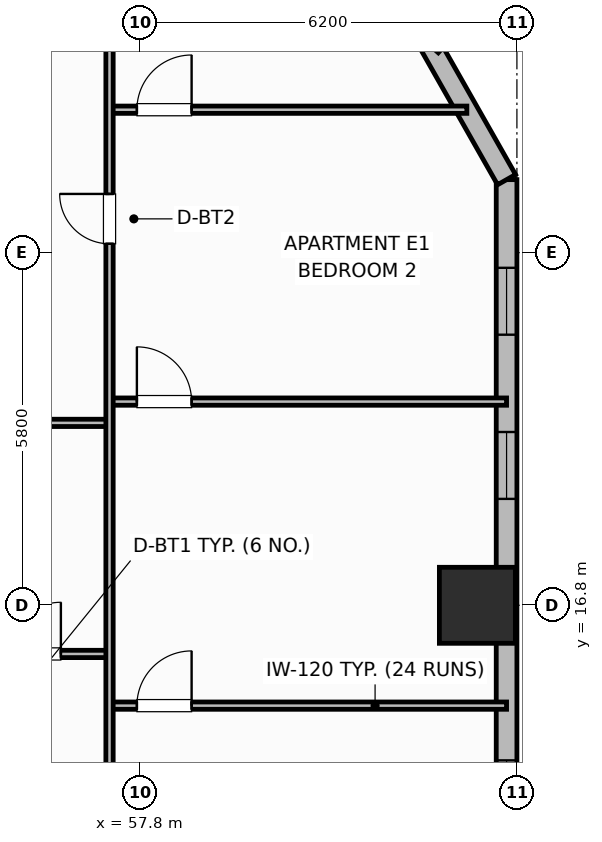
"""IFC4 building model, lengths in metres.
Left out: names, types, materials, properties, quantities, classifications, styles, units other than length and angle.
Written with IfcOpenShell. Run it as: python <this file> out.ifc"""

import sys

from ifc_helpers import new_model, si_unit, direction, frame, frame_2d, origin, origin_2d, place, context, subcontext, project, spatial, rectangle, extrude, element, fill, save


model = new_model("IFC4")
c1 = context("Model", 3, precision=1e-05, world=origin(), true_north=direction((0.0, 1.0)))
c2 = subcontext(c1, "Body", "Model", "MODEL_VIEW")
j1 = project(units=[si_unit("LENGTHUNIT", "METRE"), si_unit("PLANEANGLEUNIT", "RADIAN")], contexts=[c1])
p1 = place(None, origin())
s1 = spatial("IfcSite", under=j1, at=p1, CompositionType="ELEMENT")
p2 = place(p1, origin())
s2 = spatial("IfcBuilding", under=s1, at=p2, CompositionType="ELEMENT")
p3 = place(p2, frame((0.0, 0.0, 51.0)))
s3 = spatial("IfcBuildingStorey", under=s2, at=p3, CompositionType="ELEMENT", Elevation=51.0)
p4 = place(p3, frame((63.35, 16.8, 0.0), z_axis=(0.0, 0.0, 1.0), x_axis=(1.0, 0.0, 0.0)))
e1 = element("IfcColumn", 1, at=p4, inside=s3, PredefinedType="COLUMN", context=c2, shape_type="SweptSolid", body=[
    extrude(rectangle(XDim=1.25, YDim=1.25, at=origin_2d()), origin(), (0.0, 0.0, 1.0), 3.7),
])
p5 = place(p3, frame((63.83, 9.0, 0.0), z_axis=(0.0, 0.0, 1.0), x_axis=(0.0, 1.0, 0.0)))
e2 = element("IfcWall", 2, at=p5, inside=s3, PredefinedType="SOLIDWALL", context=c2, shape_type="SweptSolid", body=[
    extrude(rectangle(XDim=14.8, YDim=0.34, at=frame_2d((7.4, 0.0))), origin(), (0.0, 0.0, 1.0), 2.7),
])
p6 = place(p5, frame((4.15, 0.0, 0.93)))
e3 = element("IfcOpeningElement", 3, at=p6, cuts=e2, PredefinedType="OPENING", context=c2, shape_type="SweptSolid", body=[
    extrude(rectangle(XDim=1.1, YDim=1.65, at=frame_2d((0.55, 0.825))), frame((0.0, 0.18, 0.0), z_axis=(0.0, -1.0, 0.0), x_axis=(1.0, 0.0, 0.0)), (0.0, 0.0, 1.0), 0.36),
])
p7 = place(p5, frame((9.55, 0.0, 0.93)))
e4 = element("IfcOpeningElement", 4, at=p7, cuts=e2, PredefinedType="OPENING", context=c2, shape_type="SweptSolid", body=[
    extrude(rectangle(XDim=1.1, YDim=1.65, at=frame_2d((0.55, 0.825))), frame((0.0, 0.18, 0.0), z_axis=(0.0, -1.0, 0.0), x_axis=(1.0, 0.0, 0.0)), (0.0, 0.0, 1.0), 0.36),
])
p8 = place(p5, frame((12.25, 0.0, 0.93)))
e5 = element("IfcOpeningElement", 5, at=p8, cuts=e2, PredefinedType="OPENING", context=c2, shape_type="SweptSolid", body=[
    extrude(rectangle(XDim=1.1, YDim=1.65, at=frame_2d((0.55, 0.825))), frame((0.0, 0.18, 0.0), z_axis=(0.0, -1.0, 0.0), x_axis=(1.0, 0.0, 0.0)), (0.0, 0.0, 1.0), 0.36),
])
p9 = place(p3, frame((63.83, 23.8, 0.0), z_axis=(0.0, 0.0, 1.0), x_axis=(-0.494017696272, 0.869451847873, 0.0)))
e6 = element("IfcWall", 6, at=p9, inside=s3, PredefinedType="SOLIDWALL", context=c2, shape_type="SweptSolid", body=[
    extrude(rectangle(XDim=2.53, YDim=0.34, at=frame_2d((1.265, 0.0))), origin(), (0.0, 0.0, 1.0), 2.7),
])
p10 = place(p3, frame((62.58, 26.0, 0.0), z_axis=(0.0, 0.0, 1.0), x_axis=(0.666041619974, 0.74591457987, 0.0)))
e7 = element("IfcWall", 7, at=p10, inside=s3, PredefinedType="SOLIDWALL", context=c2, shape_type="SweptSolid", body=[
    extrude(rectangle(XDim=1.877, YDim=0.34, at=frame_2d((0.938, 0.0))), origin(), (0.0, 0.0, 1.0), 2.7),
])
p11 = place(p10, frame((0.16, 0.0, 0.69)))
e8 = element("IfcOpeningElement", 8, at=p11, cuts=e7, PredefinedType="OPENING", context=c2, shape_type="SweptSolid", body=[
    extrude(rectangle(XDim=1.4, YDim=1.85, at=frame_2d((0.7, 0.925))), frame((0.0, 0.18, 0.0), z_axis=(0.0, -1.0, 0.0), x_axis=(1.0, 0.0, 0.0)), (0.0, 0.0, 1.0), 0.36),
])
p12 = place(p3, frame((55.05, 16.0, 0.0), z_axis=(0.0, 0.0, 1.0), x_axis=(1.0, 0.0, 0.0)))
e9 = element("IfcWall", 9, at=p12, inside=s3, PredefinedType="PARTITIONING", context=c2, shape_type="SweptSolid", body=[
    extrude(rectangle(XDim=2.25, YDim=0.12, at=frame_2d((1.125, 0.0))), origin(), (0.0, 0.0, 1.0), 2.53),
])
p13 = place(p12, frame((0.6, 0.0, 0.0)))
e10 = element("IfcOpeningElement", 10, at=p13, cuts=e9, PredefinedType="OPENING", context=c2, shape_type="SweptSolid", body=[
    extrude(rectangle(XDim=0.85, YDim=2.1, at=frame_2d((0.425, 1.05))), frame((0.0, 0.07, 0.0), z_axis=(0.0, -1.0, 0.0), x_axis=(1.0, 0.0, 0.0)), (0.0, 0.0, 1.0), 0.14),
])
p14 = place(p3, frame((55.05, 19.8, 0.0), z_axis=(0.0, 0.0, 1.0), x_axis=(1.0, 0.0, 0.0)))
e11 = element("IfcWall", 11, at=p14, inside=s3, PredefinedType="PARTITIONING", context=c2, shape_type="SweptSolid", body=[
    extrude(rectangle(XDim=2.25, YDim=0.12, at=frame_2d((1.125, 0.0))), origin(), (0.0, 0.0, 1.0), 2.53),
])
p15 = place(p3, frame((57.3, 15.15, 0.0), z_axis=(0.0, 0.0, 1.0), x_axis=(1.0, 0.0, 0.0)))
e12 = element("IfcWall", 12, at=p15, inside=s3, PredefinedType="PARTITIONING", context=c2, shape_type="SweptSolid", body=[
    extrude(rectangle(XDim=6.53, YDim=0.12, at=frame_2d((3.265, 0.0))), origin(), (0.0, 0.0, 1.0), 2.53),
])
p16 = place(p15, frame((0.45, 0.0, 0.0)))
e13 = element("IfcOpeningElement", 13, at=p16, cuts=e12, PredefinedType="OPENING", context=c2, shape_type="SweptSolid", body=[
    extrude(rectangle(XDim=0.9, YDim=2.1, at=frame_2d((0.45, 1.05))), frame((0.0, 0.07, 0.0), z_axis=(0.0, -1.0, 0.0), x_axis=(1.0, 0.0, 0.0)), (0.0, 0.0, 1.0), 0.14),
])
p17 = place(p3, frame((57.3, 20.15, 0.0), z_axis=(0.0, 0.0, 1.0), x_axis=(1.0, 0.0, 0.0)))
e14 = element("IfcWall", 14, at=p17, inside=s3, PredefinedType="PARTITIONING", context=c2, shape_type="SweptSolid", body=[
    extrude(rectangle(XDim=6.53, YDim=0.12, at=frame_2d((3.265, 0.0))), origin(), (0.0, 0.0, 1.0), 2.53),
])
p18 = place(p17, frame((0.45, 0.0, 0.0)))
e15 = element("IfcOpeningElement", 15, at=p18, cuts=e14, PredefinedType="OPENING", context=c2, shape_type="SweptSolid", body=[
    extrude(rectangle(XDim=0.9, YDim=2.1, at=frame_2d((0.45, 1.05))), frame((0.0, 0.07, 0.0), z_axis=(0.0, -1.0, 0.0), x_axis=(1.0, 0.0, 0.0)), (0.0, 0.0, 1.0), 0.14),
])
p19 = place(p3, frame((57.3, 24.95, 0.0), z_axis=(0.0, 0.0, 1.0), x_axis=(1.0, 0.0, 0.0)))
e16 = element("IfcWall", 16, at=p19, inside=s3, PredefinedType="PARTITIONING", context=c2, shape_type="SweptSolid", body=[
    extrude(rectangle(XDim=5.876, YDim=0.12, at=frame_2d((2.938, 0.0))), origin(), (0.0, 0.0, 1.0), 2.53),
])
p20 = place(p19, frame((0.45, 0.0, 0.0)))
e17 = element("IfcOpeningElement", 17, at=p20, cuts=e16, PredefinedType="OPENING", context=c2, shape_type="SweptSolid", body=[
    extrude(rectangle(XDim=0.9, YDim=2.1, at=frame_2d((0.45, 1.05))), frame((0.0, 0.07, 0.0), z_axis=(0.0, -1.0, 0.0), x_axis=(1.0, 0.0, 0.0)), (0.0, 0.0, 1.0), 0.14),
])
p21 = place(p3, frame((57.3, 10.64, 0.0), z_axis=(0.0, 0.0, 1.0), x_axis=(0.0, 1.0, 0.0)))
e18 = element("IfcWall", 18, at=p21, inside=s3, PredefinedType="PARTITIONING", context=c2, shape_type="SweptSolid", body=[
    extrude(rectangle(XDim=19.12, YDim=0.12, at=frame_2d((9.56, 0.0))), origin(), (0.0, 0.0, 1.0), 2.53),
])
p22 = place(p21, frame((0.41, 0.0, 0.0)))
e19 = element("IfcOpeningElement", 19, at=p22, cuts=e18, PredefinedType="OPENING", context=c2, shape_type="SweptSolid", body=[
    extrude(rectangle(XDim=0.9, YDim=2.1, at=frame_2d((0.45, 1.05))), frame((0.0, 0.07, 0.0), z_axis=(0.0, -1.0, 0.0), x_axis=(1.0, 0.0, 0.0)), (0.0, 0.0, 1.0), 0.14),
])
p23 = place(p21, frame((12.105, 0.0, 0.0)))
e20 = element("IfcOpeningElement", 20, at=p23, cuts=e18, PredefinedType="OPENING", context=c2, shape_type="SweptSolid", body=[
    extrude(rectangle(XDim=0.82, YDim=2.08, at=frame_2d((0.41, 1.04))), frame((0.0, 0.07, 0.0), z_axis=(0.0, -1.0, 0.0), x_axis=(1.0, 0.0, 0.0)), (0.0, 0.0, 1.0), 0.14),
])
p24 = place(p6, origin())
e21 = element("IfcWindow", 21, at=p24, inside=s3, PartitioningType="SINGLE_PANEL", PredefinedType="WINDOW", context=c2, shape_type="SweptSolid", body=[
    extrude(rectangle(XDim=1.1, YDim=1.65, at=frame_2d((0.55, 0.825))), frame((0.0, 0.03, 0.0), z_axis=(0.0, -1.0, 0.0), x_axis=(1.0, 0.0, 0.0)), (0.0, 0.0, 1.0), 0.06),
])
fill(e3, e21)
p25 = place(p7, origin())
e22 = element("IfcWindow", 22, at=p25, inside=s3, PartitioningType="SINGLE_PANEL", PredefinedType="WINDOW", context=c2, shape_type="SweptSolid", body=[
    extrude(rectangle(XDim=1.1, YDim=1.65, at=frame_2d((0.55, 0.825))), frame((0.0, 0.03, 0.0), z_axis=(0.0, -1.0, 0.0), x_axis=(1.0, 0.0, 0.0)), (0.0, 0.0, 1.0), 0.06),
])
fill(e4, e22)
p26 = place(p8, origin())
e23 = element("IfcWindow", 23, at=p26, inside=s3, PartitioningType="SINGLE_PANEL", PredefinedType="WINDOW", context=c2, shape_type="SweptSolid", body=[
    extrude(rectangle(XDim=1.1, YDim=1.65, at=frame_2d((0.55, 0.825))), frame((0.0, 0.03, 0.0), z_axis=(0.0, -1.0, 0.0), x_axis=(1.0, 0.0, 0.0)), (0.0, 0.0, 1.0), 0.06),
])
fill(e5, e23)
p27 = place(p13, origin())
e24 = element("IfcDoor", 24, at=p27, inside=s3, OperationType="SINGLE_SWING_RIGHT", PredefinedType="DOOR", context=c2, shape_type="SweptSolid", body=[
    extrude(rectangle(XDim=0.85, YDim=2.1, at=frame_2d((0.425, 1.05))), frame((0.0, 0.025, 0.0), z_axis=(0.0, -1.0, 0.0), x_axis=(1.0, 0.0, 0.0)), (0.0, 0.0, 1.0), 0.05),
])
fill(e10, e24)
p28 = place(p16, origin())
e25 = element("IfcDoor", 25, at=p28, inside=s3, OperationType="SINGLE_SWING_RIGHT", PredefinedType="DOOR", context=c2, shape_type="SweptSolid", body=[
    extrude(rectangle(XDim=0.9, YDim=2.1, at=frame_2d((0.45, 1.05))), frame((0.0, 0.025, 0.0), z_axis=(0.0, -1.0, 0.0), x_axis=(1.0, 0.0, 0.0)), (0.0, 0.0, 1.0), 0.05),
])
fill(e13, e25)
p29 = place(p18, origin())
e26 = element("IfcDoor", 26, at=p29, inside=s3, OperationType="SINGLE_SWING_LEFT", PredefinedType="DOOR", context=c2, shape_type="SweptSolid", body=[
    extrude(rectangle(XDim=0.9, YDim=2.1, at=frame_2d((0.45, 1.05))), frame((0.0, 0.025, 0.0), z_axis=(0.0, -1.0, 0.0), x_axis=(1.0, 0.0, 0.0)), (0.0, 0.0, 1.0), 0.05),
])
fill(e15, e26)
p30 = place(p20, origin())
e27 = element("IfcDoor", 27, at=p30, inside=s3, OperationType="SINGLE_SWING_RIGHT", PredefinedType="DOOR", context=c2, shape_type="SweptSolid", body=[
    extrude(rectangle(XDim=0.9, YDim=2.1, at=frame_2d((0.45, 1.05))), frame((0.0, 0.025, 0.0), z_axis=(0.0, -1.0, 0.0), x_axis=(1.0, 0.0, 0.0)), (0.0, 0.0, 1.0), 0.05),
])
fill(e17, e27)
p31 = place(p23, origin())
e28 = element("IfcDoor", 28, at=p31, inside=s3, OperationType="SINGLE_SWING_RIGHT", PredefinedType="DOOR", context=c2, shape_type="SweptSolid", body=[
    extrude(rectangle(XDim=0.82, YDim=2.08, at=frame_2d((0.41, 1.04))), frame((0.0, 0.025, 0.0), z_axis=(0.0, -1.0, 0.0), x_axis=(1.0, 0.0, 0.0)), (0.0, 0.0, 1.0), 0.05),
])
fill(e20, e28)
save(model, sys.argv[1])
